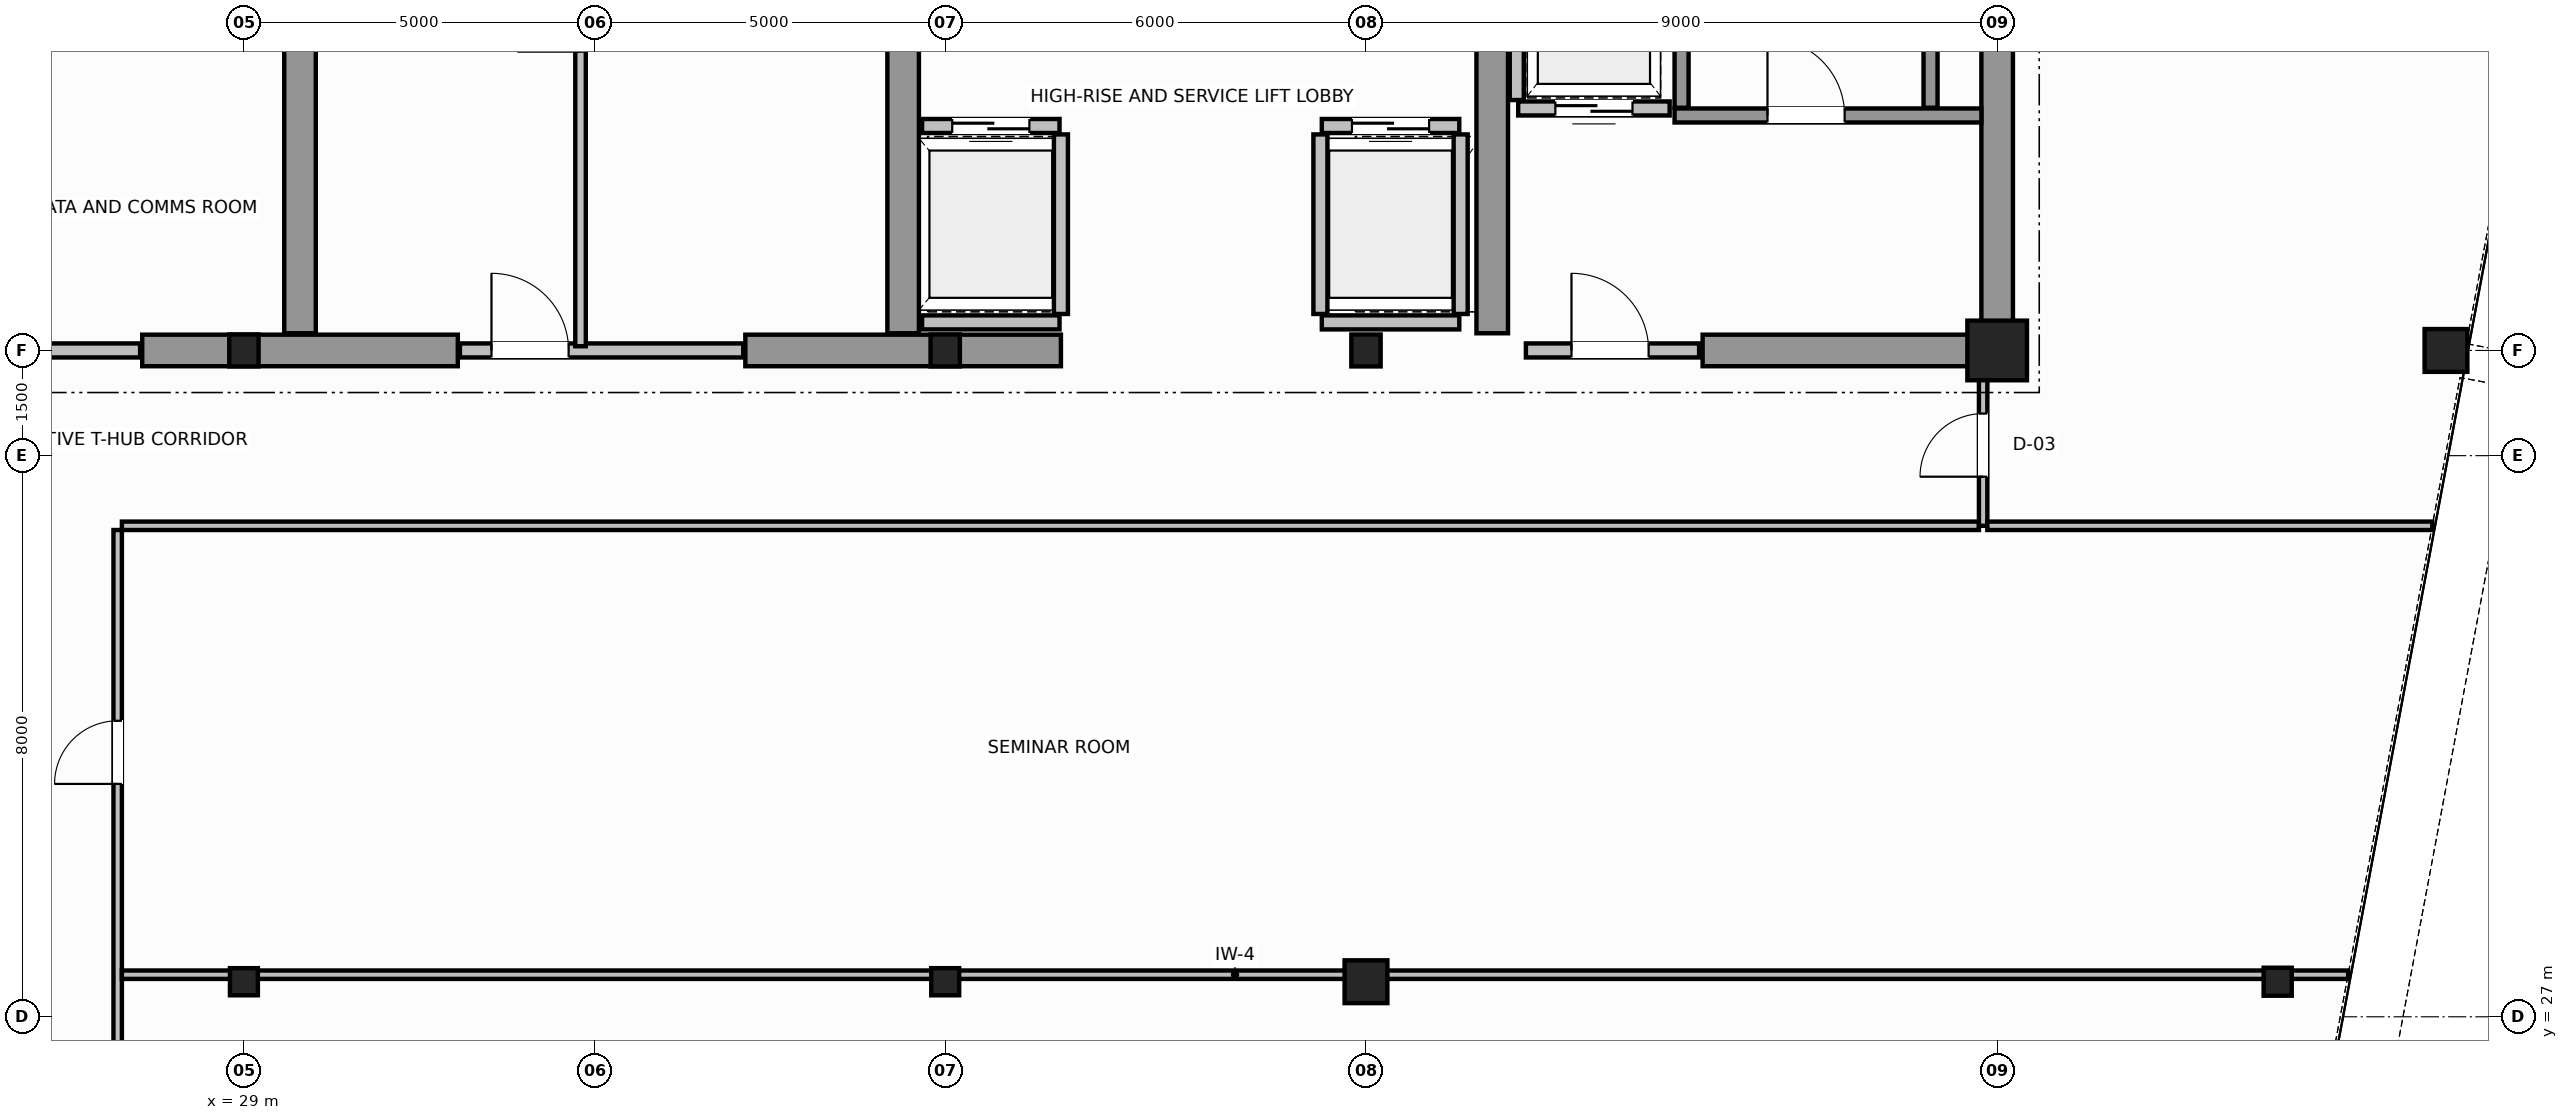
"""IFC4 building model, lengths in metres.
Left out: names, types, materials, properties, quantities, classifications, styles, units other than length and angle.
Written with IfcOpenShell. Run it as: python <this file> out.ifc"""

import sys

from ifc_helpers import new_model, si_unit, direction, frame, frame_2d, origin, origin_2d, place, context, subcontext, project, spatial, rectangle, hollow_circle, i_section, extrude, source, transform, mapped, element, fill, save


model = new_model("IFC4")
c1 = context("Model", 3, precision=1e-05, world=origin(), true_north=direction((0.0, 1.0)))
c2 = subcontext(c1, "Body", "Model", "MODEL_VIEW")
j1 = project(units=[si_unit("LENGTHUNIT", "METRE"), si_unit("PLANEANGLEUNIT", "RADIAN")], contexts=[c1])
p1 = place(None, origin())
s1 = spatial("IfcSite", under=j1, at=p1, CompositionType="ELEMENT")
p2 = place(p1, origin())
s2 = spatial("IfcBuilding", under=s1, at=p2, CompositionType="ELEMENT")
p3 = place(p2, frame((0.0, 0.0, 268.8)))
s3 = spatial("IfcBuildingStorey", under=s2, at=p3, CompositionType="ELEMENT", Elevation=268.8)
m1 = source(origin(), c2, "Body", "SweptSolid", [
    extrude(i_section(OverallWidth=0.418, OverallDepth=0.455, WebThickness=0.042, FlangeThickness=0.058, FilletRadius=0.015, at=origin_2d()), origin(), (0.0, 0.0, 1.0), 3.8),
])
for number, where, z_axis, x_axis in (
    (1, (29.0, 36.5, 0.0), (0.0, 0.0, 1.0), (1.0, 0.0, 0.0)),
    (2, (39.0, 36.5, 0.0), (0.0, 0.0, 1.0), (1.0, 0.0, 0.0)),
    (3, (45.0, 36.5, 0.0), (0.0, 0.0, 1.0), (1.0, 0.0, 0.0)),
):
    element("IfcColumn", number, at=place(p3, frame(where, z_axis=z_axis, x_axis=x_axis)), inside=s3, PredefinedType="COLUMN", context=c2, shape_type="MappedRepresentation", body=[
        mapped(m1, transform((0.0, 0.0, 0.0), scale=1.0)),
    ])
m2 = source(origin(), c2, "Body", "SweptSolid", [
    extrude(rectangle(XDim=0.85, YDim=0.85, at=origin_2d()), origin(), (0.0, 0.0, 1.0), 3.8),
])
p4 = place(p3, frame((54.0, 36.5, 0.0), z_axis=(0.0, 0.0, 1.0), x_axis=(1.0, 0.0, 0.0)))
e4 = element("IfcColumn", 4, at=p4, inside=s3, PredefinedType="COLUMN", context=c2, shape_type="MappedRepresentation", body=[
    mapped(m2, transform((0.0, 0.0, 0.0), scale=1.0)),
])
m3 = source(origin(), c2, "Body", "SweptSolid", [
    extrude(hollow_circle(Radius=0.305, WallThickness=0.03, at=origin_2d()), origin(), (0.0, 0.0, 1.0), 3.8),
])
p5 = place(p3, frame((60.4, 36.5, 0.0), z_axis=(0.0, 0.0, 1.0), x_axis=(1.0, 0.0, 0.0)))
e5 = element("IfcColumn", 5, at=p5, inside=s3, PredefinedType="COLUMN", context=c2, shape_type="MappedRepresentation", body=[
    mapped(m3, transform((0.0, 0.0, 0.0), scale=1.0)),
])
m4 = source(origin(), c2, "Body", "SweptSolid", [
    extrude(i_section(OverallWidth=0.401, OverallDepth=0.399, WebThickness=0.025, FlangeThickness=0.035, FilletRadius=0.015, at=origin_2d()), origin(), (0.0, 0.0, 1.0), 3.8),
])
p6 = place(p3, frame((58.0, 27.5, 0.0), z_axis=(0.0, 0.0, 1.0), x_axis=(1.0, 0.0, 0.0)))
e6 = element("IfcColumn", 6, at=p6, inside=s3, PredefinedType="COLUMN", context=c2, shape_type="MappedRepresentation", body=[
    mapped(m4, transform((0.0, 0.0, 0.0), scale=1.0)),
])
m5 = source(origin(), c2, "Body", "SweptSolid", [
    extrude(i_section(OverallWidth=0.398, OverallDepth=0.387, WebThickness=0.021, FlangeThickness=0.029, FilletRadius=0.015, at=origin_2d()), origin(), (0.0, 0.0, 1.0), 3.8),
])
for number, where, z_axis, x_axis in (
    (7, (29.0, 27.5, 0.0), (0.0, 0.0, 1.0), (1.0, 0.0, 0.0)),
    (8, (39.0, 27.5, 0.0), (0.0, 0.0, 1.0), (1.0, 0.0, 0.0)),
):
    element("IfcColumn", number, at=place(p3, frame(where, z_axis=z_axis, x_axis=x_axis)), inside=s3, PredefinedType="COLUMN", context=c2, shape_type="MappedRepresentation", body=[
        mapped(m5, transform((0.0, 0.0, 0.0), scale=1.0)),
    ])
p7 = place(p3, frame((45.0, 27.5, 0.0), z_axis=(0.0, 0.0, 1.0), x_axis=(1.0, 0.0, 0.0)))
e9 = element("IfcColumn", 9, at=p7, inside=s3, PredefinedType="COLUMN", context=c2, shape_type="MappedRepresentation", body=[
    mapped(m3, transform((0.0, 0.0, 0.0), scale=1.0)),
])
p8 = place(p3, frame((54.0, 36.5, 0.0), z_axis=(0.0, 0.0, 1.0), x_axis=(0.0, 1.0, 0.0)))
e10 = element("IfcWall", 10, at=p8, inside=s3, PredefinedType="SHEAR", context=c2, shape_type="SweptSolid", body=[
    extrude(rectangle(XDim=14.5, YDim=0.45, at=frame_2d((7.25, 0.0))), origin(), (0.0, 0.0, 1.0), 3.8),
])
for number, where, z_axis, x_axis in (
    (11, (27.55, 36.5, 0.0), (0.0, 0.0, 1.0), (1.0, 0.0, 0.0)),
    (12, (36.15, 36.5, 0.0), (0.0, 0.0, 1.0), (1.0, 0.0, 0.0)),
):
    element("IfcWall", number, at=place(p3, frame(where, z_axis=z_axis, x_axis=x_axis)), inside=s3, PredefinedType="SHEAR", context=c2, shape_type="SweptSolid", body=[
        extrude(rectangle(XDim=4.5, YDim=0.45, at=frame_2d((2.25, 0.0))), origin(), (0.0, 0.0, 1.0), 3.8),
    ])
p9 = place(p3, frame((49.8, 36.5, 0.0), z_axis=(0.0, 0.0, 1.0), x_axis=(1.0, 0.0, 0.0)))
e13 = element("IfcWall", 13, at=p9, inside=s3, PredefinedType="SHEAR", context=c2, shape_type="SweptSolid", body=[
    extrude(rectangle(XDim=3.955, YDim=0.45, at=frame_2d((1.978, 0.0))), origin(), (0.0, 0.0, 1.0), 2.58),
])
for number, where, z_axis, x_axis in (
    (14, (29.8, 36.745, 0.0), (0.0, 0.0, 1.0), (0.0, 1.0, 0.0)),
    (15, (38.4, 36.745, 0.0), (0.0, 0.0, 1.0), (0.0, 1.0, 0.0)),
    (16, (46.8, 36.745, 0.0), (0.0, 0.0, 1.0), (0.0, 1.0, 0.0)),
):
    element("IfcWall", number, at=place(p3, frame(where, z_axis=z_axis, x_axis=x_axis)), inside=s3, PredefinedType="SHEAR", context=c2, shape_type="SweptSolid", body=[
        extrude(rectangle(XDim=9.455, YDim=0.45, at=frame_2d((4.728, 0.0))), origin(), (0.0, 0.0, 1.0), 3.8),
    ])
p10 = place(p3, frame((49.4, 39.85, 0.0), z_axis=(0.0, 0.0, 1.0), x_axis=(1.0, 0.0, 0.0)))
e17 = element("IfcWall", 17, at=p10, inside=s3, PredefinedType="SOLIDWALL", context=c2, shape_type="SweptSolid", body=[
    extrude(rectangle(XDim=4.375, YDim=0.2, at=frame_2d((2.188, 0.0))), origin(), (0.0, 0.0, 1.0), 3.8),
])
p11 = place(p10, frame((1.325, 0.0, 0.0)))
e18 = element("IfcOpeningElement", 18, at=p11, cuts=e17, PredefinedType="OPENING", context=c2, shape_type="SweptSolid", body=[
    extrude(rectangle(XDim=1.1, YDim=2.15, at=frame_2d((0.55, 1.075))), frame((0.0, 0.11, 0.0), z_axis=(0.0, -1.0, 0.0), x_axis=(1.0, 0.0, 0.0)), (0.0, 0.0, 1.0), 0.22),
])
for number, where, z_axis, x_axis in (
    (19, (49.5, 39.96, 0.0), (0.0, 0.0, 1.0), (0.0, 1.0, 0.0)),
    (20, (53.05, 39.96, 0.0), (0.0, 0.0, 1.0), (0.0, 1.0, 0.0)),
):
    element("IfcWall", number, at=place(p3, frame(where, z_axis=z_axis, x_axis=x_axis)), inside=s3, PredefinedType="SOLIDWALL", context=c2, shape_type="SweptSolid", body=[
        extrude(rectangle(XDim=9.93, YDim=0.2, at=frame_2d((4.965, 0.0))), origin(), (0.0, 0.0, 1.0), 3.8),
    ])
p12 = place(p3, frame((47.28, 36.5, 0.0), z_axis=(0.0, 0.0, 1.0), x_axis=(1.0, 0.0, 0.0)))
e21 = element("IfcWall", 21, at=p12, inside=s3, PredefinedType="SOLIDWALL", context=c2, shape_type="SweptSolid", body=[
    extrude(rectangle(XDim=2.47, YDim=0.2, at=frame_2d((1.235, 0.0))), origin(), (0.0, 0.0, 1.0), 2.57),
])
p13 = place(p12, frame((0.65, 0.0, 0.0)))
e22 = element("IfcOpeningElement", 22, at=p13, cuts=e21, PredefinedType="OPENING", context=c2, shape_type="SweptSolid", body=[
    extrude(rectangle(XDim=1.1, YDim=2.15, at=frame_2d((0.55, 1.075))), frame((0.0, 0.11, 0.0), z_axis=(0.0, -1.0, 0.0), x_axis=(1.0, 0.0, 0.0)), (0.0, 0.0, 1.0), 0.22),
])
p14 = place(p3, frame((38.67, 39.7, 0.0), z_axis=(0.0, 0.0, 1.0), x_axis=(1.0, 0.0, 0.0)))
e23 = element("IfcWall", 23, at=p14, inside=s3, PredefinedType="SOLIDWALL", context=c2, shape_type="SweptSolid", body=[
    extrude(rectangle(XDim=1.96, YDim=0.2, at=frame_2d((0.98, 0.0))), origin(), (0.0, 0.0, 1.0), 3.58),
])
p15 = place(p14, frame((0.43, 0.0, 0.0)))
e24 = element("IfcOpeningElement", 24, at=p15, cuts=e23, PredefinedType="OPENING", context=c2, shape_type="SweptSolid", body=[
    extrude(rectangle(XDim=1.1, YDim=2.15, at=frame_2d((0.55, 1.075))), frame((0.0, 0.11, 0.0), z_axis=(0.0, -1.0, 0.0), x_axis=(1.0, 0.0, 0.0)), (0.0, 0.0, 1.0), 0.22),
])
p16 = place(p3, frame((38.67, 36.9, 0.0), z_axis=(0.0, 0.0, 1.0), x_axis=(1.0, 0.0, 0.0)))
e25 = element("IfcWall", 25, at=p16, inside=s3, PredefinedType="SOLIDWALL", context=c2, shape_type="SweptSolid", body=[
    extrude(rectangle(XDim=1.96, YDim=0.2, at=frame_2d((0.98, 0.0))), origin(), (0.0, 0.0, 1.0), 3.58),
])
p17 = place(p3, frame((40.65, 37.02, 0.0), z_axis=(0.0, 0.0, 1.0), x_axis=(0.0, 1.0, 0.0)))
e26 = element("IfcWall", 26, at=p17, inside=s3, PredefinedType="SOLIDWALL", context=c2, shape_type="SweptSolid", body=[
    extrude(rectangle(XDim=2.56, YDim=0.2, at=frame_2d((1.28, 0.0))), origin(), (0.0, 0.0, 1.0), 3.58),
])
p18 = place(p3, frame((44.37, 39.7, 0.0), z_axis=(0.0, 0.0, 1.0), x_axis=(1.0, 0.0, 0.0)))
e27 = element("IfcWall", 27, at=p18, inside=s3, PredefinedType="SOLIDWALL", context=c2, shape_type="SweptSolid", body=[
    extrude(rectangle(XDim=1.96, YDim=0.2, at=frame_2d((0.98, 0.0))), origin(), (0.0, 0.0, 1.0), 3.58),
])
p19 = place(p18, frame((0.43, 0.0, 0.0)))
e28 = element("IfcOpeningElement", 28, at=p19, cuts=e27, PredefinedType="OPENING", context=c2, shape_type="SweptSolid", body=[
    extrude(rectangle(XDim=1.1, YDim=2.15, at=frame_2d((0.55, 1.075))), frame((0.0, 0.11, 0.0), z_axis=(0.0, -1.0, 0.0), x_axis=(1.0, 0.0, 0.0)), (0.0, 0.0, 1.0), 0.22),
])
p20 = place(p3, frame((44.37, 36.9, 0.0), z_axis=(0.0, 0.0, 1.0), x_axis=(1.0, 0.0, 0.0)))
e29 = element("IfcWall", 29, at=p20, inside=s3, PredefinedType="SOLIDWALL", context=c2, shape_type="SweptSolid", body=[
    extrude(rectangle(XDim=1.96, YDim=0.2, at=frame_2d((0.98, 0.0))), origin(), (0.0, 0.0, 1.0), 2.57),
])
for number, where, z_axis, x_axis in (
    (30, (44.35, 37.02, 0.0), (0.0, 0.0, 1.0), (0.0, 1.0, 0.0)),
    (31, (46.35, 37.02, 0.0), (0.0, 0.0, 1.0), (0.0, 1.0, 0.0)),
):
    element("IfcWall", number, at=place(p3, frame(where, z_axis=z_axis, x_axis=x_axis)), inside=s3, PredefinedType="SOLIDWALL", context=c2, shape_type="SweptSolid", body=[
        extrude(rectangle(XDim=2.56, YDim=0.2, at=frame_2d((1.28, 0.0))), origin(), (0.0, 0.0, 1.0), 3.58),
    ])
p21 = place(p3, frame((47.17, 39.95, 0.0), z_axis=(0.0, 0.0, 1.0), x_axis=(1.0, 0.0, 0.0)))
e32 = element("IfcWall", 32, at=p21, inside=s3, PredefinedType="SOLIDWALL", context=c2, shape_type="SweptSolid", body=[
    extrude(rectangle(XDim=2.16, YDim=0.2, at=frame_2d((1.08, 0.0))), origin(), (0.0, 0.0, 1.0), 3.58),
])
p22 = place(p21, frame((0.53, 0.0, 0.0)))
e33 = element("IfcOpeningElement", 33, at=p22, cuts=e32, PredefinedType="OPENING", context=c2, shape_type="SweptSolid", body=[
    extrude(rectangle(XDim=1.1, YDim=2.15, at=frame_2d((0.55, 1.075))), frame((0.0, 0.11, 0.0), z_axis=(0.0, -1.0, 0.0), x_axis=(1.0, 0.0, 0.0)), (0.0, 0.0, 1.0), 0.22),
])
p23 = place(p3, frame((47.15, 40.07, 0.0), z_axis=(0.0, 0.0, 1.0), x_axis=(0.0, 1.0, 0.0)))
e34 = element("IfcWall", 34, at=p23, inside=s3, PredefinedType="SOLIDWALL", context=c2, shape_type="SweptSolid", body=[
    extrude(rectangle(XDim=2.56, YDim=0.2, at=frame_2d((1.28, 0.0))), origin(), (0.0, 0.0, 1.0), 3.58),
])
p24 = place(p3, frame((21.25, 36.5, 0.0), z_axis=(0.0, 0.0, 1.0), x_axis=(1.0, 0.0, 0.0)))
e35 = element("IfcWall", 35, at=p24, inside=s3, PredefinedType="SOLIDWALL", context=c2, shape_type="SweptSolid", body=[
    extrude(rectangle(XDim=6.27, YDim=0.2, at=frame_2d((3.135, 0.0))), origin(), (0.0, 0.0, 1.0), 2.57),
])
p25 = place(p24, frame((2.6, 0.0, 0.0)))
e36 = element("IfcOpeningElement", 36, at=p25, cuts=e35, PredefinedType="OPENING", context=c2, shape_type="SweptSolid", body=[
    extrude(rectangle(XDim=1.1, YDim=2.15, at=frame_2d((0.55, 1.075))), frame((0.0, 0.11, 0.0), z_axis=(0.0, -1.0, 0.0), x_axis=(1.0, 0.0, 0.0)), (0.0, 0.0, 1.0), 0.22),
])
p26 = place(p3, frame((32.08, 36.5, 0.0), z_axis=(0.0, 0.0, 1.0), x_axis=(1.0, 0.0, 0.0)))
e37 = element("IfcWall", 37, at=p26, inside=s3, PredefinedType="SOLIDWALL", context=c2, shape_type="SweptSolid", body=[
    extrude(rectangle(XDim=4.04, YDim=0.2, at=frame_2d((2.02, 0.0))), origin(), (0.0, 0.0, 1.0), 3.02),
])
p27 = place(p26, frame((0.45, 0.0, 0.0)))
e38 = element("IfcOpeningElement", 38, at=p27, cuts=e37, PredefinedType="OPENING", context=c2, shape_type="SweptSolid", body=[
    extrude(rectangle(XDim=1.1, YDim=2.15, at=frame_2d((0.55, 1.075))), frame((0.0, 0.11, 0.0), z_axis=(0.0, -1.0, 0.0), x_axis=(1.0, 0.0, 0.0)), (0.0, 0.0, 1.0), 0.22),
])
p28 = place(p3, frame((33.8, 36.56, 0.0), z_axis=(0.0, 0.0, 1.0), x_axis=(0.0, 1.0, 0.0)))
e39 = element("IfcWall", 39, at=p28, inside=s3, PredefinedType="PARTITIONING", context=c2, shape_type="SweptSolid", body=[
    extrude(rectangle(XDim=9.58, YDim=0.15, at=frame_2d((4.79, 0.0))), origin(), (0.0, 0.0, 1.0), 3.58),
])
p29 = place(p28, frame((4.2, 0.0, 0.0)))
e40 = element("IfcOpeningElement", 40, at=p29, cuts=e39, PredefinedType="OPENING", context=c2, shape_type="SweptSolid", body=[
    extrude(rectangle(XDim=0.9, YDim=2.1, at=frame_2d((0.45, 1.05))), frame((0.0, 0.085, 0.0), z_axis=(0.0, -1.0, 0.0), x_axis=(1.0, 0.0, 0.0)), (0.0, 0.0, 1.0), 0.17),
])
p30 = place(p3, frame((27.26, 34.0, 0.0), z_axis=(0.0, 0.0, 1.0), x_axis=(1.0, 0.0, 0.0)))
e41 = element("IfcWall", 41, at=p30, inside=s3, PredefinedType="PARTITIONING", context=c2, shape_type="SweptSolid", body=[
    extrude(rectangle(XDim=26.48, YDim=0.12, at=frame_2d((13.24, 0.0))), origin(), (0.0, 0.0, 1.0), 3.58),
])
p31 = place(p3, frame((53.8, 34.0, 0.0), z_axis=(0.0, 0.0, 1.0), x_axis=(0.0, 1.0, 0.0)))
e42 = element("IfcWall", 42, at=p31, inside=s3, PredefinedType="PARTITIONING", context=c2, shape_type="SweptSolid", body=[
    extrude(rectangle(XDim=2.44, YDim=0.12, at=frame_2d((1.22, 0.0))), origin(), (0.0, 0.0, 1.0), 3.58),
])
p32 = place(p31, frame((0.7, 0.0, 0.0)))
e43 = element("IfcOpeningElement", 43, at=p32, cuts=e42, PredefinedType="OPENING", context=c2, shape_type="SweptSolid", body=[
    extrude(rectangle(XDim=0.9, YDim=2.15, at=frame_2d((0.45, 1.075))), frame((0.0, 0.07, 0.0), z_axis=(0.0, -1.0, 0.0), x_axis=(1.0, 0.0, 0.0)), (0.0, 0.0, 1.0), 0.14),
])
p33 = place(p3, frame((27.2, 20.8, 0.0), z_axis=(0.0, 0.0, 1.0), x_axis=(0.0, 1.0, 0.0)))
e44 = element("IfcWall", 44, at=p33, inside=s3, PredefinedType="PARTITIONING", context=c2, shape_type="SweptSolid", body=[
    extrude(rectangle(XDim=13.14, YDim=0.12, at=frame_2d((6.57, 0.0))), origin(), (0.0, 0.0, 1.0), 3.58),
])
p34 = place(p33, frame((2.95, 0.0, 0.0)))
e45 = element("IfcOpeningElement", 45, at=p34, cuts=e44, PredefinedType="OPENING", context=c2, shape_type="SweptSolid", body=[
    extrude(rectangle(XDim=0.9, YDim=2.15, at=frame_2d((0.45, 1.075))), frame((0.0, 0.07, 0.0), z_axis=(0.0, -1.0, 0.0), x_axis=(1.0, 0.0, 0.0)), (0.0, 0.0, 1.0), 0.14),
])
p35 = place(p33, frame((9.52, 0.0, 0.0)))
e46 = element("IfcOpeningElement", 46, at=p35, cuts=e44, PredefinedType="OPENING", context=c2, shape_type="SweptSolid", body=[
    extrude(rectangle(XDim=0.9, YDim=2.15, at=frame_2d((0.45, 1.075))), frame((0.0, 0.07, 0.0), z_axis=(0.0, -1.0, 0.0), x_axis=(1.0, 0.0, 0.0)), (0.0, 0.0, 1.0), 0.14),
])
p36 = place(p3, frame((53.86, 34.0, 0.0), z_axis=(0.0, 0.0, 1.0), x_axis=(1.0, 0.0, 0.0)))
e47 = element("IfcWall", 47, at=p36, inside=s3, PredefinedType="PARTITIONING", context=c2, shape_type="SweptSolid", body=[
    extrude(rectangle(XDim=6.344, YDim=0.12, at=frame_2d((3.172, 0.0))), origin(), (0.0, 0.0, 1.0), 3.58),
])
p37 = place(p3, frame((27.26, 27.6, 0.0), z_axis=(0.0, 0.0, 1.0), x_axis=(1.0, 0.0, 0.0)))
e48 = element("IfcWall", 48, at=p37, inside=s3, PredefinedType="PARTITIONING", context=c2, shape_type="SweptSolid", body=[
    extrude(rectangle(XDim=31.745, YDim=0.12, at=frame_2d((15.872, 0.0))), origin(), (0.0, 0.0, 1.0), 3.02),
])
m6 = source(origin(), c2, "Body", "SweptSolid", [
    extrude(rectangle(XDim=1.1, YDim=2.15, at=frame_2d((0.55, 1.075))), frame((0.0, 0.025, 0.0), z_axis=(0.0, -1.0, 0.0), x_axis=(1.0, 0.0, 0.0)), (0.0, 0.0, 1.0), 0.05),
])
p38 = place(p11, origin())
e49 = element("IfcDoor", 49, at=p38, inside=s3, OperationType="SINGLE_SWING_RIGHT", PredefinedType="DOOR", context=c2, shape_type="MappedRepresentation", body=[
    mapped(m6, transform((0.0, 0.0, 0.0), scale=1.0)),
])
fill(e18, e49)
p39 = place(p13, origin())
e50 = element("IfcDoor", 50, at=p39, inside=s3, OperationType="SINGLE_SWING_LEFT", PredefinedType="DOOR", context=c2, shape_type="MappedRepresentation", body=[
    mapped(m6, transform((0.0, 0.0, 0.0), scale=1.0)),
])
fill(e22, e50)
p40 = place(p15, origin())
e51 = element("IfcDoor", 51, at=p40, inside=s3, OperationType="DOUBLE_DOOR_SLIDING", PredefinedType="DOOR", context=c2, shape_type="MappedRepresentation", body=[
    mapped(m6, transform((0.0, 0.0, 0.0), scale=1.0)),
])
fill(e24, e51)
p41 = place(p19, origin())
e52 = element("IfcDoor", 52, at=p41, inside=s3, OperationType="DOUBLE_DOOR_SLIDING", PredefinedType="DOOR", context=c2, shape_type="MappedRepresentation", body=[
    mapped(m6, transform((0.0, 0.0, 0.0), scale=1.0)),
])
fill(e28, e52)
p42 = place(p22, origin())
e53 = element("IfcDoor", 53, at=p42, inside=s3, OperationType="DOUBLE_DOOR_SLIDING", PredefinedType="DOOR", context=c2, shape_type="MappedRepresentation", body=[
    mapped(m6, transform((0.0, 0.0, 0.0), scale=1.0)),
])
fill(e33, e53)
p43 = place(p27, origin())
e54 = element("IfcDoor", 54, at=p43, inside=s3, OperationType="SINGLE_SWING_LEFT", PredefinedType="DOOR", context=c2, shape_type="MappedRepresentation", body=[
    mapped(m6, transform((0.0, 0.0, 0.0), scale=1.0)),
])
fill(e38, e54)
m7 = source(origin(), c2, "Body", "SweptSolid", [
    extrude(rectangle(XDim=0.9, YDim=2.15, at=frame_2d((0.45, 1.075))), frame((0.0, 0.025, 0.0), z_axis=(0.0, -1.0, 0.0), x_axis=(1.0, 0.0, 0.0)), (0.0, 0.0, 1.0), 0.05),
])
p44 = place(p32, origin())
e55 = element("IfcDoor", 55, at=p44, inside=s3, OperationType="SINGLE_SWING_RIGHT", PredefinedType="DOOR", context=c2, shape_type="MappedRepresentation", body=[
    mapped(m7, transform((0.0, 0.0, 0.0), scale=1.0)),
])
fill(e43, e55)
p45 = place(p35, origin())
e56 = element("IfcDoor", 56, at=p45, inside=s3, OperationType="SINGLE_SWING_LEFT", PredefinedType="DOOR", context=c2, shape_type="MappedRepresentation", body=[
    mapped(m7, transform((0.0, 0.0, 0.0), scale=1.0)),
])
fill(e46, e56)
save(model, sys.argv[1])
